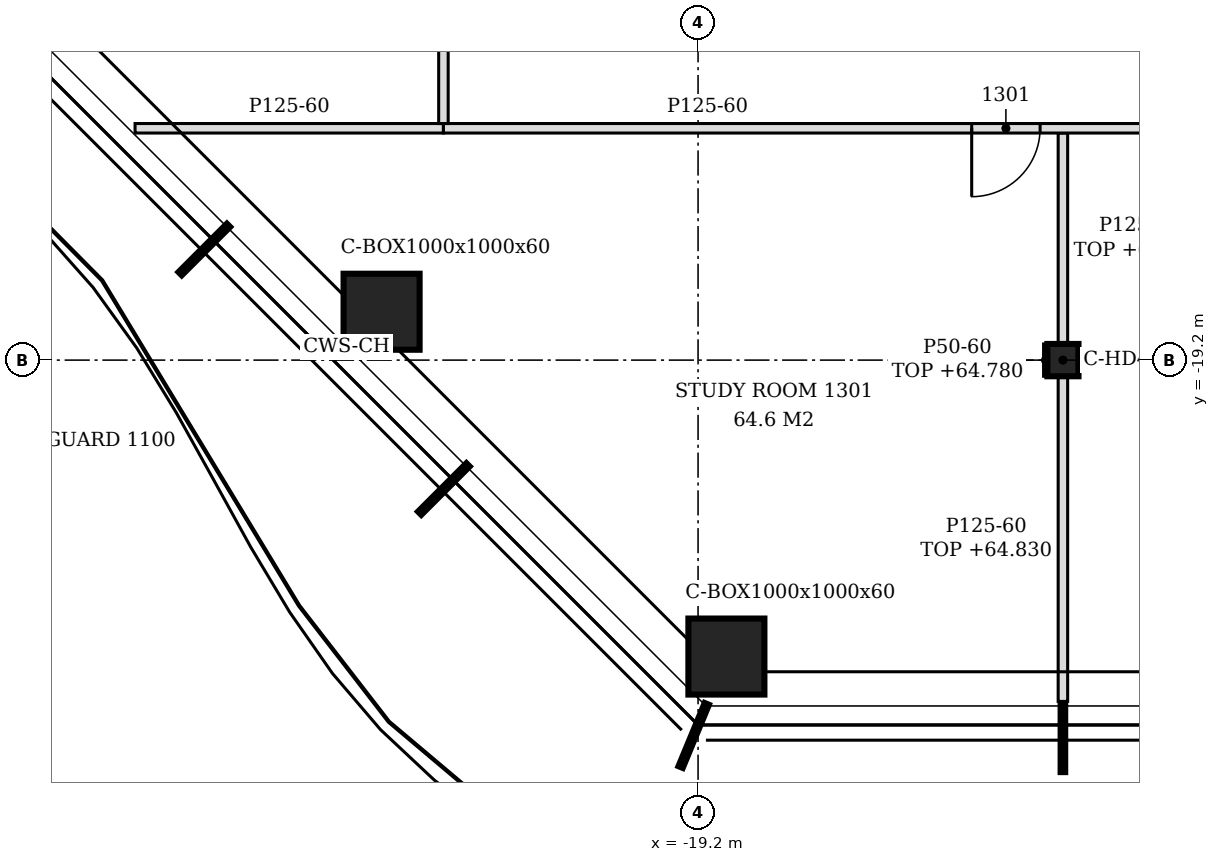
"""IFC4 building model, lengths in metres.
Left out: names, types, materials, properties, quantities, classifications, styles, units other than length and angle.
Written with IfcOpenShell. Run it as: python <this file> out.ifc"""

import sys

from ifc_helpers import new_model, si_unit, direction, frame, frame_2d, origin, origin_2d, place, context, subcontext, project, spatial, polyline, rectangle, hollow_rectangle, i_section, outline, extrude, element, fill, save


model = new_model("IFC4")
c1 = context("Model", 3, precision=1e-05, world=origin(), true_north=direction((0.0, 1.0)))
c2 = subcontext(c1, "Body", "Model", "MODEL_VIEW")
j1 = project(units=[si_unit("LENGTHUNIT", "METRE"), si_unit("PLANEANGLEUNIT", "RADIAN")], contexts=[c1])
p1 = place(None, origin())
s1 = spatial("IfcSite", under=j1, at=p1, CompositionType="ELEMENT")
p2 = place(p1, origin())
s2 = spatial("IfcBuilding", under=s1, at=p2, CompositionType="ELEMENT")
p3 = place(p2, frame((0.0, 0.0, 61.8)))
s3 = spatial("IfcBuildingStorey", under=s2, at=p3, CompositionType="ELEMENT", Elevation=61.8)
for number, where, z_axis, x_axis in (
    (1, (-18.827, -23.1, -0.15), (0.0, 0.0, 1.0), (1.0, 0.0, 0.0)),
    (2, (-23.364, -18.564, -0.15), (0.0, 0.0, 1.0), (1.0, 0.0, 0.0)),
):
    element("IfcColumn", number, at=place(p3, frame(where, z_axis=z_axis, x_axis=x_axis)), inside=s3, PredefinedType="COLUMN", context=c2, shape_type="SweptSolid", body=[
        extrude(hollow_rectangle(XDim=1.0, YDim=1.0, WallThickness=0.06, at=origin_2d()), origin(), (0.0, 0.0, 1.0), 3.6),
    ])
p4 = place(p3, frame((-14.4, -19.2, -0.15), z_axis=(0.0, 0.0, 1.0), x_axis=(1.0, 0.0, 0.0)))
e3 = element("IfcColumn", 3, at=p4, inside=s3, PredefinedType="COLUMN", context=c2, shape_type="SweptSolid", body=[
    extrude(i_section(OverallWidth=0.409, OverallDepth=0.425, WebThickness=0.033, FlangeThickness=0.052, FilletRadius=0.015, at=origin_2d()), origin(), (0.0, 0.0, 1.0), 3.6),
])
p5 = place(p3, frame((-14.4, -23.69, 0.0), z_axis=(0.0, 0.0, 1.0), x_axis=(0.0, 1.0, 0.0)))
e4 = element("IfcWall", 4, at=p5, inside=s3, PredefinedType="PARTITIONING", context=c2, shape_type="SweptSolid", body=[
    extrude(outline(polyline([(0.0, 0.0), (4.277, 0.0), (4.278, 3.03), (0.74, 3.03), (0.738, 2.93), (0.44, 2.93), (0.438, 3.03), (0.0, 3.03), (0.0, 0.0)])), frame((0.0, 0.062, 0.0), z_axis=(0.0, -1.0, 0.0), x_axis=(1.0, 0.0, 0.0)), (0.0, 0.0, 1.0), 0.125),
])
p6 = place(p3, frame((-14.4, -18.988, 0.0), z_axis=(0.0, 0.0, 1.0), x_axis=(0.0, 1.0, 0.0)))
e5 = element("IfcWall", 5, at=p6, inside=s3, PredefinedType="PARTITIONING", context=c2, shape_type="SweptSolid", body=[
    extrude(rectangle(XDim=2.775, YDim=0.125, at=frame_2d((1.388, 0.0))), origin(), (0.0, 0.0, 1.0), 2.93),
])
p7 = place(p3, frame((-26.607, -16.15, 0.0), z_axis=(0.0, 0.0, 1.0), x_axis=(1.0, 0.0, 0.0)))
e6 = element("IfcWall", 6, at=p7, inside=s3, PredefinedType="PARTITIONING", context=c2, shape_type="SweptSolid", body=[
    extrude(outline(polyline([(0.0, 0.0), (4.057, 0.0), (4.057, 3.45), (1.104, 3.45), (1.102, 2.93), (0.555, 2.93), (0.553, 3.45), (0.0, 3.45), (0.0, 0.0)])), frame((0.0, 0.062, 0.0), z_axis=(0.0, -1.0, 0.0), x_axis=(1.0, 0.0, 0.0)), (0.0, 0.0, 1.0), 0.125),
])
p8 = place(p3, frame((-22.55, -16.15, 0.0), z_axis=(0.0, 0.0, 1.0), x_axis=(1.0, 0.0, 0.0)))
e7 = element("IfcWall", 7, at=p8, inside=s3, PredefinedType="PARTITIONING", context=c2, shape_type="SweptSolid", body=[
    extrude(outline(polyline([(0.0, 0.0), (41.688, 0.0), (41.688, 2.73), (41.6, 2.73), (41.598, 3.45), (29.9, 3.45), (29.898, 2.73), (29.6, 2.73), (29.598, 3.45), (17.9, 3.45), (17.898, 2.73), (17.6, 2.73), (17.598, 3.45), (8.3, 3.45), (8.298, 2.93), (8.0, 2.93), (7.998, 3.45), (0.0, 3.45), (0.0, 0.0)])), frame((0.0, 0.062, 0.0), z_axis=(0.0, -1.0, 0.0), x_axis=(1.0, 0.0, 0.0)), (0.0, 0.0, 1.0), 0.125),
])
p9 = place(p8, frame((6.95, 0.0, 0.0)))
e8 = element("IfcOpeningElement", 8, at=p9, cuts=e7, PredefinedType="OPENING", context=c2, shape_type="SweptSolid", body=[
    extrude(rectangle(XDim=0.9, YDim=2.1, at=frame_2d((0.45, 1.05))), frame((0.0, 0.073, 0.0), z_axis=(0.0, -1.0, 0.0), x_axis=(1.0, 0.0, 0.0)), (0.0, 0.0, 1.0), 0.145),
])
p10 = place(p8, frame((11.936, 0.0, 0.0)))
e9 = element("IfcOpeningElement", 9, at=p10, cuts=e7, PredefinedType="OPENING", context=c2, shape_type="SweptSolid", body=[
    extrude(rectangle(XDim=0.9, YDim=2.1, at=frame_2d((0.45, 1.05))), frame((0.0, 0.073, 0.0), z_axis=(0.0, -1.0, 0.0), x_axis=(1.0, 0.0, 0.0)), (0.0, 0.0, 1.0), 0.145),
])
p11 = place(p8, frame((16.55, 0.0, 0.0)))
e10 = element("IfcOpeningElement", 10, at=p11, cuts=e7, PredefinedType="OPENING", context=c2, shape_type="SweptSolid", body=[
    extrude(rectangle(XDim=0.9, YDim=2.1, at=frame_2d((0.45, 1.05))), frame((0.0, 0.073, 0.0), z_axis=(0.0, -1.0, 0.0), x_axis=(1.0, 0.0, 0.0)), (0.0, 0.0, 1.0), 0.145),
])
p12 = place(p8, frame((21.35, 0.0, 0.0)))
e11 = element("IfcOpeningElement", 11, at=p12, cuts=e7, PredefinedType="OPENING", context=c2, shape_type="SweptSolid", body=[
    extrude(rectangle(XDim=0.9, YDim=2.1, at=frame_2d((0.45, 1.05))), frame((0.0, 0.073, 0.0), z_axis=(0.0, -1.0, 0.0), x_axis=(1.0, 0.0, 0.0)), (0.0, 0.0, 1.0), 0.145),
])
p13 = place(p8, frame((26.15, 0.0, 0.0)))
e12 = element("IfcOpeningElement", 12, at=p13, cuts=e7, PredefinedType="OPENING", context=c2, shape_type="SweptSolid", body=[
    extrude(rectangle(XDim=0.9, YDim=2.1, at=frame_2d((0.45, 1.05))), frame((0.0, 0.073, 0.0), z_axis=(0.0, -1.0, 0.0), x_axis=(1.0, 0.0, 0.0)), (0.0, 0.0, 1.0), 0.145),
])
p14 = place(p8, frame((30.764, 0.0, 0.0)))
e13 = element("IfcOpeningElement", 13, at=p14, cuts=e7, PredefinedType="OPENING", context=c2, shape_type="SweptSolid", body=[
    extrude(rectangle(XDim=0.9, YDim=2.1, at=frame_2d((0.45, 1.05))), frame((0.0, 0.073, 0.0), z_axis=(0.0, -1.0, 0.0), x_axis=(1.0, 0.0, 0.0)), (0.0, 0.0, 1.0), 0.145),
])
p15 = place(p8, frame((32.35, 0.0, 0.0)))
e14 = element("IfcOpeningElement", 14, at=p15, cuts=e7, PredefinedType="OPENING", context=c2, shape_type="SweptSolid", body=[
    extrude(rectangle(XDim=0.9, YDim=2.1, at=frame_2d((0.45, 1.05))), frame((0.0, 0.073, 0.0), z_axis=(0.0, -1.0, 0.0), x_axis=(1.0, 0.0, 0.0)), (0.0, 0.0, 1.0), 0.145),
])
p16 = place(p8, frame((37.25, 0.0, 0.0)))
e15 = element("IfcOpeningElement", 15, at=p16, cuts=e7, PredefinedType="OPENING", context=c2, shape_type="SweptSolid", body=[
    extrude(rectangle(XDim=0.9, YDim=2.1, at=frame_2d((0.45, 1.05))), frame((0.0, 0.073, 0.0), z_axis=(0.0, -1.0, 0.0), x_axis=(1.0, 0.0, 0.0)), (0.0, 0.0, 1.0), 0.145),
])
p17 = place(p3, frame((-22.55, -16.087, 0.0), z_axis=(0.0, 0.0, 1.0), x_axis=(0.0, 1.0, 0.0)))
e16 = element("IfcWall", 16, at=p17, inside=s3, PredefinedType="PARTITIONING", context=c2, shape_type="SweptSolid", body=[
    extrude(outline(polyline([(0.0, 0.0), (36.276, 0.0), (36.276, 3.45), (36.022, 3.45), (36.02, 2.63), (34.907, 2.63), (34.905, 3.45), (30.597, 3.45), (30.595, 2.83), (30.377, 2.83), (30.375, 3.45), (25.798, 3.45), (25.795, 2.83), (25.577, 2.83), (25.575, 3.45), (20.998, 3.45), (20.996, 2.83), (20.778, 2.83), (20.775, 3.45), (16.198, 3.45), (16.196, 2.83), (15.978, 2.83), (15.976, 3.45), (11.397, 3.45), (11.396, 2.83), (11.177, 2.83), (11.176, 3.45), (6.597, 3.45), (6.595, 2.83), (6.377, 2.83), (6.375, 3.45), (1.798, 3.45), (1.795, 2.83), (1.577, 2.83), (1.575, 3.45), (0.0, 3.45), (0.0, 0.0)])), frame((0.0, 0.062, 0.0), z_axis=(0.0, -1.0, 0.0), x_axis=(1.0, 0.0, 0.0)), (0.0, 0.0, 1.0), 0.125),
])
p18 = place(p17, frame((10.137, 0.0, 0.0)))
e17 = element("IfcOpeningElement", 17, at=p18, cuts=e16, PredefinedType="OPENING", context=c2, shape_type="SweptSolid", body=[
    extrude(rectangle(XDim=0.9, YDim=2.1, at=frame_2d((0.45, 1.05))), frame((0.0, 0.073, 0.0), z_axis=(0.0, -1.0, 0.0), x_axis=(1.0, 0.0, 0.0)), (0.0, 0.0, 1.0), 0.145),
])
p19 = place(p17, frame((11.711, 0.0, 0.0)))
e18 = element("IfcOpeningElement", 18, at=p19, cuts=e16, PredefinedType="OPENING", context=c2, shape_type="SweptSolid", body=[
    extrude(rectangle(XDim=0.9, YDim=2.1, at=frame_2d((0.45, 1.05))), frame((0.0, 0.073, 0.0), z_axis=(0.0, -1.0, 0.0), x_axis=(1.0, 0.0, 0.0)), (0.0, 0.0, 1.0), 0.145),
])
p20 = place(p17, frame((17.288, 0.0, 0.0)))
e19 = element("IfcOpeningElement", 19, at=p20, cuts=e16, PredefinedType="OPENING", context=c2, shape_type="SweptSolid", body=[
    extrude(rectangle(XDim=0.9, YDim=2.1, at=frame_2d((0.45, 1.05))), frame((0.0, 0.073, 0.0), z_axis=(0.0, -1.0, 0.0), x_axis=(1.0, 0.0, 0.0)), (0.0, 0.0, 1.0), 0.145),
])
p21 = place(p17, frame((21.063, 0.0, 0.0)))
e20 = element("IfcOpeningElement", 20, at=p21, cuts=e16, PredefinedType="OPENING", context=c2, shape_type="SweptSolid", body=[
    extrude(rectangle(XDim=0.9, YDim=2.1, at=frame_2d((0.45, 1.05))), frame((0.0, 0.073, 0.0), z_axis=(0.0, -1.0, 0.0), x_axis=(1.0, 0.0, 0.0)), (0.0, 0.0, 1.0), 0.145),
])
p22 = place(p17, frame((27.188, 0.0, 0.0)))
e21 = element("IfcOpeningElement", 21, at=p22, cuts=e16, PredefinedType="OPENING", context=c2, shape_type="SweptSolid", body=[
    extrude(rectangle(XDim=0.9, YDim=2.1, at=frame_2d((0.45, 1.05))), frame((0.0, 0.073, 0.0), z_axis=(0.0, -1.0, 0.0), x_axis=(1.0, 0.0, 0.0)), (0.0, 0.0, 1.0), 0.145),
])
p23 = place(p17, frame((30.415, 0.0, 0.0)))
e22 = element("IfcOpeningElement", 22, at=p23, cuts=e16, PredefinedType="OPENING", context=c2, shape_type="SweptSolid", body=[
    extrude(rectangle(XDim=0.9, YDim=2.1, at=frame_2d((0.45, 1.05))), frame((0.0, 0.073, 0.0), z_axis=(0.0, -1.0, 0.0), x_axis=(1.0, 0.0, 0.0)), (0.0, 0.0, 1.0), 0.145),
])
p24 = place(p3, frame((-14.629, -19.413, 0.0), z_axis=(0.0, 0.0, 1.0), x_axis=(0.0, 1.0, 0.0)))
e23 = element("IfcWall", 23, at=p24, inside=s3, PredefinedType="PARTITIONING", context=c2, shape_type="SweptSolid", body=[
    extrude(rectangle(XDim=0.425, YDim=0.05, at=frame_2d((0.212, 0.0))), origin(), (0.0, 0.0, 1.0), 2.98),
])
p25 = place(p9, frame((0.9, 0.0, 0.0), z_axis=(0.0, 0.0, 1.0), x_axis=(-1.0, 0.0, 0.0)))
e24 = element("IfcDoor", 24, at=p25, inside=s3, OperationType="SINGLE_SWING_RIGHT", PredefinedType="DOOR", context=c2, shape_type="SweptSolid", body=[
    extrude(rectangle(XDim=0.9, YDim=2.1, at=frame_2d((0.45, 1.05))), frame((0.0, 0.025, 0.0), z_axis=(0.0, -1.0, 0.0), x_axis=(1.0, 0.0, 0.0)), (0.0, 0.0, 1.0), 0.05),
])
fill(e8, e24)
save(model, sys.argv[1])
